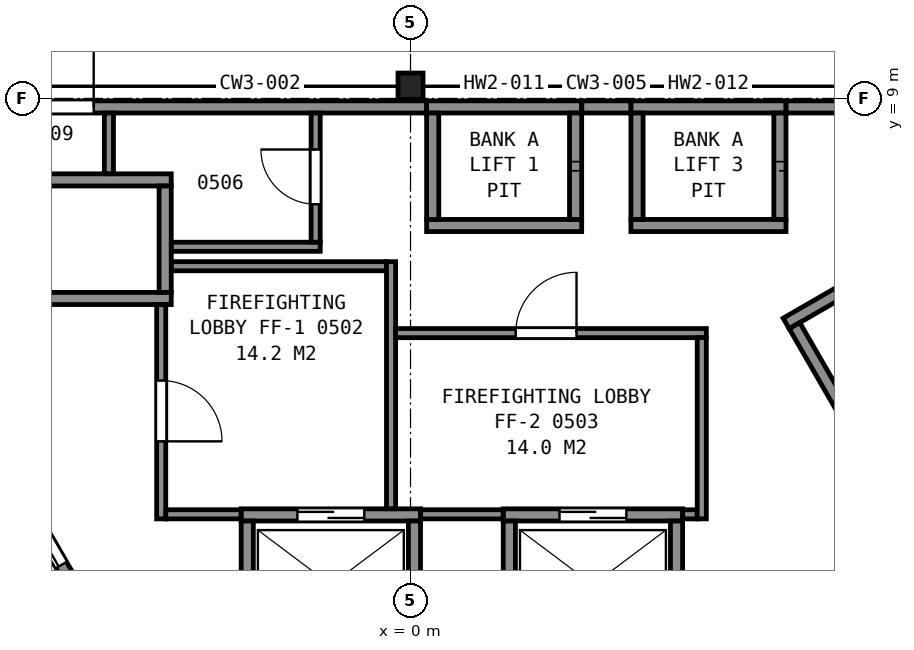
"""IFC4 building model, lengths in metres.
Left out: names, types, materials, properties, quantities, classifications, styles, units other than length and angle.
Written with IfcOpenShell. Run it as: python <this file> out.ifc"""

import sys

from ifc_helpers import new_model, si_unit, direction, frame, frame_2d, origin, origin_2d, place, context, subcontext, project, spatial, rectangle, i_section, extrude, element, fill, save


model = new_model("IFC4")
c1 = context("Model", 3, precision=1e-05, world=origin(), true_north=direction((0.0, 1.0)))
c2 = subcontext(c1, "Body", "Model", "MODEL_VIEW")
j1 = project(units=[si_unit("LENGTHUNIT", "METRE"), si_unit("PLANEANGLEUNIT", "RADIAN")], contexts=[c1])
p1 = place(None, origin())
s1 = spatial("IfcSite", under=j1, at=p1, CompositionType="ELEMENT")
p2 = place(p1, origin())
s2 = spatial("IfcBuilding", under=s1, at=p2, CompositionType="ELEMENT")
p3 = place(p2, frame((0.0, 0.0, 32.0)))
s3 = spatial("IfcBuildingStorey", under=s2, at=p3, CompositionType="ELEMENT", Elevation=32.0)
p4 = place(p3, frame((0.0, 9.2, 0.0), z_axis=(0.0, 0.0, 1.0), x_axis=(1.0, 0.0, 0.0)))
e1 = element("IfcColumn", 1, at=p4, inside=s3, PredefinedType="COLUMN", context=c2, shape_type="SweptSolid", body=[
    extrude(i_section(OverallWidth=0.411, OverallDepth=0.434, WebThickness=0.036, FlangeThickness=0.057, FilletRadius=0.015, at=origin_2d()), origin(), (0.0, 0.0, 1.0), 4.8),
])
p5 = place(p3, frame((6.178, 5.299, 0.0), z_axis=(0.0, 0.0, 1.0), x_axis=(0.866026010844, 0.49999894854, 0.0)))
e2 = element("IfcWall", 2, at=p5, inside=s3, PredefinedType="PARTITIONING", context=c2, shape_type="SweptSolid", body=[
    extrude(rectangle(XDim=12.0, YDim=0.2, at=frame_2d((6.0, 0.0))), origin(), (0.0, 0.0, 1.0), 4.55),
])
p6 = place(p3, frame((7.715, 2.838, 0.0), z_axis=(0.0, 0.0, 1.0), x_axis=(-0.500049511043, 0.865996816683, 0.0)))
e3 = element("IfcWall", 3, at=p6, inside=s3, PredefinedType="PARTITIONING", context=c2, shape_type="SweptSolid", body=[
    extrude(rectangle(XDim=2.8, YDim=0.2, at=frame_2d((1.4, 0.0))), origin(), (0.0, 0.0, 1.0), 4.55),
])
p7 = place(p3, frame((-2.785, 2.15, 0.0), z_axis=(0.0, 0.0, 1.0), x_axis=(1.0, 0.0, 0.0)))
e4 = element("IfcWall", 4, at=p7, inside=s3, PredefinedType="PARTITIONING", context=c2, shape_type="SweptSolid", body=[
    extrude(rectangle(XDim=2.95, YDim=0.2, at=frame_2d((1.475, 0.0))), origin(), (0.0, 0.0, 1.0), 4.8),
])
p8 = place(p7, frame((0.925, 0.0, 0.0)))
e5 = element("IfcOpeningElement", 5, at=p8, cuts=e4, PredefinedType="OPENING", context=c2, shape_type="SweptSolid", body=[
    extrude(rectangle(XDim=1.1, YDim=2.1, at=frame_2d((0.55, 1.05))), frame((0.0, 0.11, 0.0), z_axis=(0.0, -1.0, 0.0), x_axis=(1.0, 0.0, 0.0)), (0.0, 0.0, 1.0), 0.22),
])
p9 = place(p3, frame((1.525, 2.15, 0.0), z_axis=(0.0, 0.0, 1.0), x_axis=(1.0, 0.0, 0.0)))
e6 = element("IfcWall", 6, at=p9, inside=s3, PredefinedType="PARTITIONING", context=c2, shape_type="SweptSolid", body=[
    extrude(rectangle(XDim=2.95, YDim=0.2, at=frame_2d((1.475, 0.0))), origin(), (0.0, 0.0, 1.0), 4.8),
])
p10 = place(p9, frame((0.925, 0.0, 0.0)))
e7 = element("IfcOpeningElement", 7, at=p10, cuts=e6, PredefinedType="OPENING", context=c2, shape_type="SweptSolid", body=[
    extrude(rectangle(XDim=1.1, YDim=2.1, at=frame_2d((0.55, 1.05))), frame((0.0, 0.11, 0.0), z_axis=(0.0, -1.0, 0.0), x_axis=(1.0, 0.0, 0.0)), (0.0, 0.0, 1.0), 0.22),
])
p11 = place(p3, frame((-6.285, 5.71, 0.0), z_axis=(0.0, 0.0, 1.0), x_axis=(1.0, 0.0, 0.0)))
e8 = element("IfcWall", 8, at=p11, inside=s3, PredefinedType="PARTITIONING", context=c2, shape_type="SweptSolid", body=[
    extrude(rectangle(XDim=2.35, YDim=0.2, at=frame_2d((1.175, 0.0))), origin(), (0.0, 0.0, 1.0), 4.8),
])
for number, where, z_axis, x_axis in (
    (9, (0.265, 6.91, 0.0), (0.0, 0.0, 1.0), (1.0, 0.0, 0.0)),
    (10, (3.625, 6.91, 0.0), (0.0, 0.0, 1.0), (1.0, 0.0, 0.0)),
):
    element("IfcWall", number, at=place(p3, frame(where, z_axis=z_axis, x_axis=x_axis)), inside=s3, PredefinedType="PARTITIONING", context=c2, shape_type="SweptSolid", body=[
        extrude(rectangle(XDim=2.55, YDim=0.2, at=frame_2d((1.275, 0.0))), origin(), (0.0, 0.0, 1.0), 4.8),
    ])
p12 = place(p3, frame((-6.285, 7.66, 0.0), z_axis=(0.0, 0.0, 1.0), x_axis=(1.0, 0.0, 0.0)))
e11 = element("IfcWall", 11, at=p12, inside=s3, PredefinedType="PARTITIONING", context=c2, shape_type="SweptSolid", body=[
    extrude(rectangle(XDim=2.35, YDim=0.2, at=frame_2d((1.175, 0.0))), origin(), (0.0, 0.0, 1.0), 4.8),
])
for number, where, z_axis, x_axis in (
    (12, (0.265, 8.86, 0.0), (0.0, 0.0, 1.0), (1.0, 0.0, 0.0)),
    (13, (3.625, 8.86, 0.0), (0.0, 0.0, 1.0), (1.0, 0.0, 0.0)),
):
    element("IfcWall", number, at=place(p3, frame(where, z_axis=z_axis, x_axis=x_axis)), inside=s3, PredefinedType="PARTITIONING", context=c2, shape_type="SweptSolid", body=[
        extrude(rectangle(XDim=2.55, YDim=0.2, at=frame_2d((1.275, 0.0))), origin(), (0.0, 0.0, 1.0), 4.8),
    ])
p13 = place(p3, frame((5.663, -1.612, 0.0), z_axis=(0.0, 0.0, 1.0), x_axis=(0.49998122708, 0.866036242063, 0.0)))
e14 = element("IfcWall", 14, at=p13, inside=s3, PredefinedType="PARTITIONING", context=c2, shape_type="SweptSolid", body=[
    extrude(rectangle(XDim=4.9, YDim=0.2, at=frame_2d((2.45, 0.0))), origin(), (0.0, 0.0, 1.0), 4.8),
])
p14 = place(p3, frame((6.075, 7.01, 0.0), z_axis=(0.0, 0.0, 1.0), x_axis=(0.0, 1.0, 0.0)))
e15 = element("IfcWall", 15, at=p14, inside=s3, PredefinedType="PARTITIONING", context=c2, shape_type="SweptSolid", body=[
    extrude(rectangle(XDim=1.75, YDim=0.2, at=frame_2d((0.875, 0.0))), origin(), (0.0, 0.0, 1.0), 4.8),
])
p15 = place(p3, frame((4.375, 0.1, 0.0), z_axis=(0.0, 0.0, 1.0), x_axis=(0.0, 1.0, 0.0)))
e16 = element("IfcWall", 16, at=p15, inside=s3, PredefinedType="PARTITIONING", context=c2, shape_type="SweptSolid", body=[
    extrude(rectangle(XDim=1.95, YDim=0.2, at=frame_2d((0.975, 0.0))), origin(), (0.0, 0.0, 1.0), 4.8),
])
for number, where, z_axis, x_axis in (
    (17, (3.725, 7.01, 0.0), (0.0, 0.0, 1.0), (0.0, 1.0, 0.0)),
    (18, (2.715, 7.01, 0.0), (0.0, 0.0, 1.0), (0.0, 1.0, 0.0)),
):
    element("IfcWall", number, at=place(p3, frame(where, z_axis=z_axis, x_axis=x_axis)), inside=s3, PredefinedType="PARTITIONING", context=c2, shape_type="SweptSolid", body=[
        extrude(rectangle(XDim=1.75, YDim=0.2, at=frame_2d((0.875, 0.0))), origin(), (0.0, 0.0, 1.0), 4.8),
    ])
p16 = place(p3, frame((1.625, 0.1, 0.0), z_axis=(0.0, 0.0, 1.0), x_axis=(0.0, 1.0, 0.0)))
e19 = element("IfcWall", 19, at=p16, inside=s3, PredefinedType="PARTITIONING", context=c2, shape_type="SweptSolid", body=[
    extrude(rectangle(XDim=1.95, YDim=0.2, at=frame_2d((0.975, 0.0))), origin(), (0.0, 0.0, 1.0), 4.8),
])
p17 = place(p3, frame((0.365, 7.01, 0.0), z_axis=(0.0, 0.0, 1.0), x_axis=(0.0, 1.0, 0.0)))
e20 = element("IfcWall", 20, at=p17, inside=s3, PredefinedType="PARTITIONING", context=c2, shape_type="SweptSolid", body=[
    extrude(rectangle(XDim=1.75, YDim=0.2, at=frame_2d((0.875, 0.0))), origin(), (0.0, 0.0, 1.0), 4.8),
])
for number, where, z_axis, x_axis in (
    (21, (0.065, 0.1, 0.0), (0.0, 0.0, 1.0), (0.0, 1.0, 0.0)),
    (22, (-2.685, 0.1, 0.0), (0.0, 0.0, 1.0), (0.0, 1.0, 0.0)),
):
    element("IfcWall", number, at=place(p3, frame(where, z_axis=z_axis, x_axis=x_axis)), inside=s3, PredefinedType="PARTITIONING", context=c2, shape_type="SweptSolid", body=[
        extrude(rectangle(XDim=1.95, YDim=0.2, at=frame_2d((0.975, 0.0))), origin(), (0.0, 0.0, 1.0), 4.8),
    ])
p18 = place(p3, frame((-4.035, 5.81, 0.0), z_axis=(0.0, 0.0, 1.0), x_axis=(0.0, 1.0, 0.0)))
e23 = element("IfcWall", 23, at=p18, inside=s3, PredefinedType="PARTITIONING", context=c2, shape_type="SweptSolid", body=[
    extrude(rectangle(XDim=1.75, YDim=0.2, at=frame_2d((0.875, 0.0))), origin(), (0.0, 0.0, 1.0), 4.8),
])
p19 = place(p3, frame((-5.28, 0.525, 0.0), z_axis=(0.0, 0.0, 1.0), x_axis=(-0.500037662692, 0.866003658127, 0.0)))
e24 = element("IfcWall", 24, at=p19, inside=s3, PredefinedType="PARTITIONING", context=c2, shape_type="SweptSolid", body=[
    extrude(rectangle(XDim=2.95, YDim=0.2, at=frame_2d((1.475, 0.0))), origin(), (0.0, 0.0, 1.0), 4.8),
])
p20 = place(p19, frame((0.925, 0.0, 0.0)))
e25 = element("IfcOpeningElement", 25, at=p20, cuts=e24, PredefinedType="OPENING", context=c2, shape_type="SweptSolid", body=[
    extrude(rectangle(XDim=1.1, YDim=2.1, at=frame_2d((0.55, 1.05))), frame((0.0, 0.11, 0.0), z_axis=(0.0, -1.0, 0.0), x_axis=(1.0, 0.0, 0.0)), (0.0, 0.0, 1.0), 0.22),
])
p21 = place(p3, frame((0.263, 8.86, 0.0), z_axis=(0.0, 0.0, 1.0), x_axis=(-1.0, 0.0, 0.0)))
e26 = element("IfcWall", 26, at=p21, inside=s3, PredefinedType="PARTITIONING", context=c2, shape_type="SweptSolid", body=[
    extrude(rectangle(XDim=12.254, YDim=0.2, at=frame_2d((6.127, 0.0))), origin(), (0.0, 0.0, 1.0), 4.55),
])
p22 = place(p21, frame((5.473, 0.0, 0.0)))
e27 = element("IfcOpeningElement", 27, at=p22, cuts=e26, PredefinedType="OPENING", context=c2, shape_type="SweptSolid", body=[
    extrude(rectangle(XDim=1.8, YDim=2.1, at=frame_2d((0.9, 1.05))), frame((0.0, 0.11, 0.0), z_axis=(0.0, -1.0, 0.0), x_axis=(1.0, 0.0, 0.0)), (0.0, 0.0, 1.0), 0.22),
])
p23 = place(p3, frame((-4.96, 7.762, 0.0), z_axis=(0.0, 0.0, 1.0), x_axis=(0.0, 1.0, 0.0)))
e28 = element("IfcWall", 28, at=p23, inside=s3, PredefinedType="PARTITIONING", context=c2, shape_type="SweptSolid", body=[
    extrude(rectangle(XDim=0.998, YDim=0.15, at=frame_2d((0.499, 0.0))), origin(), (0.0, 0.0, 1.0), 4.55),
])
p24 = place(p3, frame((-4.1, 2.085, 0.0), z_axis=(0.0, 0.0, 1.0), x_axis=(0.0, 1.0, 0.0)))
e29 = element("IfcWall", 29, at=p24, inside=s3, PredefinedType="PARTITIONING", context=c2, shape_type="SweptSolid", body=[
    extrude(rectangle(XDim=3.523, YDim=0.15, at=frame_2d((1.761, 0.0))), origin(), (0.0, 0.0, 1.0), 4.55),
])
p25 = place(p24, frame((1.275, 0.0, 0.0)))
e30 = element("IfcOpeningElement", 30, at=p25, cuts=e29, PredefinedType="OPENING", context=c2, shape_type="SweptSolid", body=[
    extrude(rectangle(XDim=1.0, YDim=2.1, at=frame_2d((0.5, 1.05))), frame((0.0, 0.085, 0.0), z_axis=(0.0, -1.0, 0.0), x_axis=(1.0, 0.0, 0.0)), (0.0, 0.0, 1.0), 0.17),
])
p26 = place(p3, frame((-4.025, 2.16, 0.0), z_axis=(0.0, 0.0, 1.0), x_axis=(1.0, 0.0, 0.0)))
e31 = element("IfcWall", 31, at=p26, inside=s3, PredefinedType="PARTITIONING", context=c2, shape_type="SweptSolid", body=[
    extrude(rectangle(XDim=1.238, YDim=0.15, at=frame_2d((0.619, 0.0))), origin(), (0.0, 0.0, 1.0), 4.55),
])
p27 = place(p3, frame((-3.933, 6.24, 0.0), z_axis=(0.0, 0.0, 1.0), x_axis=(1.0, 0.0, 0.0)))
e32 = element("IfcWall", 32, at=p27, inside=s3, PredefinedType="PARTITIONING", context=c2, shape_type="SweptSolid", body=[
    extrude(rectangle(XDim=3.538, YDim=0.15, at=frame_2d((1.769, 0.0))), origin(), (0.0, 0.0, 1.0), 4.55),
])
p28 = place(p3, frame((-3.933, 6.56, 0.0), z_axis=(0.0, 0.0, 1.0), x_axis=(1.0, 0.0, 0.0)))
e33 = element("IfcWall", 33, at=p28, inside=s3, PredefinedType="PARTITIONING", context=c2, shape_type="SweptSolid", body=[
    extrude(rectangle(XDim=2.448, YDim=0.15, at=frame_2d((1.224, 0.0))), origin(), (0.0, 0.0, 1.0), 4.55),
])
p29 = place(p3, frame((-1.56, 6.635, 0.0), z_axis=(0.0, 0.0, 1.0), x_axis=(0.0, 1.0, 0.0)))
e34 = element("IfcWall", 34, at=p29, inside=s3, PredefinedType="PARTITIONING", context=c2, shape_type="SweptSolid", body=[
    extrude(rectangle(XDim=2.125, YDim=0.15, at=frame_2d((1.062, 0.0))), origin(), (0.0, 0.0, 1.0), 4.55),
])
p30 = place(p29, frame((0.625, 0.0, 0.0)))
e35 = element("IfcOpeningElement", 35, at=p30, cuts=e34, PredefinedType="OPENING", context=c2, shape_type="SweptSolid", body=[
    extrude(rectangle(XDim=0.9, YDim=2.1, at=frame_2d((0.45, 1.05))), frame((0.0, 0.085, 0.0), z_axis=(0.0, -1.0, 0.0), x_axis=(1.0, 0.0, 0.0)), (0.0, 0.0, 1.0), 0.17),
])
p31 = place(p3, frame((-0.32, 2.252, 0.0), z_axis=(0.0, 0.0, 1.0), x_axis=(0.0, 1.0, 0.0)))
e36 = element("IfcWall", 36, at=p31, inside=s3, PredefinedType="PARTITIONING", context=c2, shape_type="SweptSolid", body=[
    extrude(rectangle(XDim=4.063, YDim=0.15, at=frame_2d((2.031, 0.0))), origin(), (0.0, 0.0, 1.0), 4.55),
])
p32 = place(p3, frame((-0.245, 5.14, 0.0), z_axis=(0.0, 0.0, 1.0), x_axis=(1.0, 0.0, 0.0)))
e37 = element("IfcWall", 37, at=p32, inside=s3, PredefinedType="PARTITIONING", context=c2, shape_type="SweptSolid", body=[
    extrude(rectangle(XDim=5.11, YDim=0.15, at=frame_2d((2.555, 0.0))), origin(), (0.0, 0.0, 1.0), 4.55),
])
p33 = place(p32, frame((1.975, 0.0, 0.0)))
e38 = element("IfcOpeningElement", 38, at=p33, cuts=e37, PredefinedType="OPENING", context=c2, shape_type="SweptSolid", body=[
    extrude(rectangle(XDim=1.0, YDim=2.1, at=frame_2d((0.5, 1.05))), frame((0.0, 0.085, 0.0), z_axis=(0.0, -1.0, 0.0), x_axis=(1.0, 0.0, 0.0)), (0.0, 0.0, 1.0), 0.17),
])
p34 = place(p3, frame((0.167, 2.16, 0.0), z_axis=(0.0, 0.0, 1.0), x_axis=(1.0, 0.0, 0.0)))
e39 = element("IfcWall", 39, at=p34, inside=s3, PredefinedType="PARTITIONING", context=c2, shape_type="SweptSolid", body=[
    extrude(rectangle(XDim=1.356, YDim=0.15, at=frame_2d((0.678, 0.0))), origin(), (0.0, 0.0, 1.0), 4.55),
])
p35 = place(p3, frame((2.817, 8.86, 0.0), z_axis=(0.0, 0.0, 1.0), x_axis=(1.0, 0.0, 0.0)))
e40 = element("IfcWall", 40, at=p35, inside=s3, PredefinedType="PARTITIONING", context=c2, shape_type="SweptSolid", body=[
    extrude(rectangle(XDim=0.806, YDim=0.2, at=frame_2d((0.403, 0.0))), origin(), (0.0, 0.0, 1.0), 4.55),
])
p36 = place(p3, frame((4.477, 2.16, 0.0), z_axis=(0.0, 0.0, 1.0), x_axis=(1.0, 0.0, 0.0)))
e41 = element("IfcWall", 41, at=p36, inside=s3, PredefinedType="PARTITIONING", context=c2, shape_type="SweptSolid", body=[
    extrude(rectangle(XDim=0.238, YDim=0.15, at=frame_2d((0.119, 0.0))), origin(), (0.0, 0.0, 1.0), 4.55),
])
p37 = place(p3, frame((4.79, 2.085, 0.0), z_axis=(0.0, 0.0, 1.0), x_axis=(0.0, 1.0, 0.0)))
e42 = element("IfcWall", 42, at=p37, inside=s3, PredefinedType="PARTITIONING", context=c2, shape_type="SweptSolid", body=[
    extrude(rectangle(XDim=2.98, YDim=0.15, at=frame_2d((1.49, 0.0))), origin(), (0.0, 0.0, 1.0), 4.55),
])
p38 = place(p3, frame((6.177, 8.86, 0.0), z_axis=(0.0, 0.0, 1.0), x_axis=(1.0, 0.0, 0.0)))
e43 = element("IfcWall", 43, at=p38, inside=s3, PredefinedType="PARTITIONING", context=c2, shape_type="SweptSolid", body=[
    extrude(rectangle(XDim=5.814, YDim=0.2, at=frame_2d((2.907, 0.0))), origin(), (0.0, 0.0, 1.0), 4.55),
])
p39 = place(p3, frame((-4.438, -20.054, 0.0), z_axis=(0.0, 0.0, 1.0), x_axis=(-0.499994028088, 0.866028851642, 0.0)))
e44 = element("IfcWall", 44, at=p39, inside=s3, PredefinedType="PARTITIONING", context=c2, shape_type="SweptSolid", body=[
    extrude(rectangle(XDim=30.297, YDim=0.125, at=frame_2d((15.148, 0.0))), origin(), (0.0, 0.0, 1.0), 3.793),
])
p40 = place(p39, frame((26.385, 0.0, 0.0)))
e45 = element("IfcOpeningElement", 45, at=p40, cuts=e44, PredefinedType="OPENING", context=c2, shape_type="SweptSolid", body=[
    extrude(rectangle(XDim=1.0, YDim=2.1, at=frame_2d((0.5, 1.05))), frame((0.0, 0.073, 0.0), z_axis=(0.0, -1.0, 0.0), x_axis=(1.0, 0.0, 0.0)), (0.0, 0.0, 1.0), 0.145),
])
p41 = place(p39, frame((18.831, 0.0, 0.0)))
e46 = element("IfcOpeningElement", 46, at=p41, cuts=e44, PredefinedType="OPENING", context=c2, shape_type="SweptSolid", body=[
    extrude(rectangle(XDim=1.0, YDim=2.1, at=frame_2d((0.5, 1.05))), frame((0.0, 0.073, 0.0), z_axis=(0.0, -1.0, 0.0), x_axis=(1.0, 0.0, 0.0)), (0.0, 0.0, 1.0), 0.145),
])
p42 = place(p39, frame((10.449, 0.0, 0.0)))
e47 = element("IfcOpeningElement", 47, at=p42, cuts=e44, PredefinedType="OPENING", context=c2, shape_type="SweptSolid", body=[
    extrude(rectangle(XDim=1.0, YDim=2.1, at=frame_2d((0.5, 1.05))), frame((0.0, 0.073, 0.0), z_axis=(0.0, -1.0, 0.0), x_axis=(1.0, 0.0, 0.0)), (0.0, 0.0, 1.0), 0.145),
])
p43 = place(p39, frame((2.916, 0.0, 0.0)))
e48 = element("IfcOpeningElement", 48, at=p43, cuts=e44, PredefinedType="OPENING", context=c2, shape_type="SweptSolid", body=[
    extrude(rectangle(XDim=1.0, YDim=2.1, at=frame_2d((0.5, 1.05))), frame((0.0, 0.073, 0.0), z_axis=(0.0, -1.0, 0.0), x_axis=(1.0, 0.0, 0.0)), (0.0, 0.0, 1.0), 0.145),
])
p44 = place(p3, frame((19.586, 6.184, 0.0), z_axis=(0.0, 0.0, 1.0), x_axis=(-0.499994028088, -0.866028851642, 0.0)))
e49 = element("IfcWall", 49, at=p44, inside=s3, PredefinedType="PARTITIONING", context=c2, shape_type="SweptSolid", body=[
    extrude(rectangle(XDim=30.297, YDim=0.125, at=frame_2d((15.148, 0.0))), origin(), (0.0, 0.0, 1.0), 3.793),
])
p45 = place(p44, frame((26.385, 0.0, 0.0)))
e50 = element("IfcOpeningElement", 50, at=p45, cuts=e49, PredefinedType="OPENING", context=c2, shape_type="SweptSolid", body=[
    extrude(rectangle(XDim=1.0, YDim=2.1, at=frame_2d((0.5, 1.05))), frame((0.0, 0.073, 0.0), z_axis=(0.0, -1.0, 0.0), x_axis=(1.0, 0.0, 0.0)), (0.0, 0.0, 1.0), 0.145),
])
p46 = place(p44, frame((20.932, 0.0, 0.0)))
e51 = element("IfcOpeningElement", 51, at=p46, cuts=e49, PredefinedType="OPENING", context=c2, shape_type="SweptSolid", body=[
    extrude(rectangle(XDim=1.0, YDim=2.1, at=frame_2d((0.5, 1.05))), frame((0.0, 0.073, 0.0), z_axis=(0.0, -1.0, 0.0), x_axis=(1.0, 0.0, 0.0)), (0.0, 0.0, 1.0), 0.145),
])
p47 = place(p44, frame((16.741, 0.0, 0.0)))
e52 = element("IfcOpeningElement", 52, at=p47, cuts=e49, PredefinedType="OPENING", context=c2, shape_type="SweptSolid", body=[
    extrude(rectangle(XDim=1.0, YDim=2.1, at=frame_2d((0.5, 1.05))), frame((0.0, 0.073, 0.0), z_axis=(0.0, -1.0, 0.0), x_axis=(1.0, 0.0, 0.0)), (0.0, 0.0, 1.0), 0.145),
])
p48 = place(p44, frame((10.449, 0.0, 0.0)))
e53 = element("IfcOpeningElement", 53, at=p48, cuts=e49, PredefinedType="OPENING", context=c2, shape_type="SweptSolid", body=[
    extrude(rectangle(XDim=1.0, YDim=2.1, at=frame_2d((0.5, 1.05))), frame((0.0, 0.073, 0.0), z_axis=(0.0, -1.0, 0.0), x_axis=(1.0, 0.0, 0.0)), (0.0, 0.0, 1.0), 0.145),
])
p49 = place(p44, frame((2.916, 0.0, 0.0)))
e54 = element("IfcOpeningElement", 54, at=p49, cuts=e49, PredefinedType="OPENING", context=c2, shape_type="SweptSolid", body=[
    extrude(rectangle(XDim=1.0, YDim=2.1, at=frame_2d((0.5, 1.05))), frame((0.0, 0.073, 0.0), z_axis=(0.0, -1.0, 0.0), x_axis=(1.0, 0.0, 0.0)), (0.0, 0.0, 1.0), 0.145),
])
p50 = place(p8, origin())
e55 = element("IfcDoor", 55, at=p50, inside=s3, OperationType="SLIDING_TO_LEFT", PredefinedType="DOOR", context=c2, shape_type="SweptSolid", body=[
    extrude(rectangle(XDim=1.1, YDim=2.1, at=frame_2d((0.55, 1.05))), frame((0.0, 0.025, 0.0), z_axis=(0.0, -1.0, 0.0), x_axis=(1.0, 0.0, 0.0)), (0.0, 0.0, 1.0), 0.05),
])
fill(e5, e55)
p51 = place(p10, origin())
e56 = element("IfcDoor", 56, at=p51, inside=s3, OperationType="SLIDING_TO_RIGHT", PredefinedType="DOOR", context=c2, shape_type="SweptSolid", body=[
    extrude(rectangle(XDim=1.1, YDim=2.1, at=frame_2d((0.55, 1.05))), frame((0.0, 0.025, 0.0), z_axis=(0.0, -1.0, 0.0), x_axis=(1.0, 0.0, 0.0)), (0.0, 0.0, 1.0), 0.05),
])
fill(e7, e56)
p52 = place(p20, origin())
e57 = element("IfcDoor", 57, at=p52, inside=s3, OperationType="SLIDING_TO_LEFT", PredefinedType="DOOR", context=c2, shape_type="SweptSolid", body=[
    extrude(rectangle(XDim=1.1, YDim=2.1, at=frame_2d((0.55, 1.05))), frame((0.0, 0.025, 0.0), z_axis=(0.0, -1.0, 0.0), x_axis=(1.0, 0.0, 0.0)), (0.0, 0.0, 1.0), 0.05),
])
fill(e25, e57)
p53 = place(p22, origin())
e58 = element("IfcDoor", 58, at=p53, inside=s3, OperationType="DOUBLE_DOOR_SINGLE_SWING", PredefinedType="DOOR", context=c2, shape_type="SweptSolid", body=[
    extrude(rectangle(XDim=1.8, YDim=2.1, at=frame_2d((0.9, 1.05))), frame((0.0, 0.025, 0.0), z_axis=(0.0, -1.0, 0.0), x_axis=(1.0, 0.0, 0.0)), (0.0, 0.0, 1.0), 0.05),
])
fill(e27, e58)
p54 = place(p25, origin())
e59 = element("IfcDoor", 59, at=p54, inside=s3, OperationType="SINGLE_SWING_LEFT", PredefinedType="DOOR", context=c2, shape_type="SweptSolid", body=[
    extrude(rectangle(XDim=1.0, YDim=2.1, at=frame_2d((0.5, 1.05))), frame((0.0, 0.025, 0.0), z_axis=(0.0, -1.0, 0.0), x_axis=(1.0, 0.0, 0.0)), (0.0, 0.0, 1.0), 0.05),
])
fill(e30, e59)
p55 = place(p30, origin())
e60 = element("IfcDoor", 60, at=p55, inside=s3, OperationType="SINGLE_SWING_RIGHT", PredefinedType="DOOR", context=c2, shape_type="SweptSolid", body=[
    extrude(rectangle(XDim=0.9, YDim=2.1, at=frame_2d((0.45, 1.05))), frame((0.0, 0.025, 0.0), z_axis=(0.0, -1.0, 0.0), x_axis=(1.0, 0.0, 0.0)), (0.0, 0.0, 1.0), 0.05),
])
fill(e35, e60)
p56 = place(p33, origin())
e61 = element("IfcDoor", 61, at=p56, inside=s3, OperationType="SINGLE_SWING_RIGHT", PredefinedType="DOOR", context=c2, shape_type="SweptSolid", body=[
    extrude(rectangle(XDim=1.0, YDim=2.1, at=frame_2d((0.5, 1.05))), frame((0.0, 0.025, 0.0), z_axis=(0.0, -1.0, 0.0), x_axis=(1.0, 0.0, 0.0)), (0.0, 0.0, 1.0), 0.05),
])
fill(e38, e61)
save(model, sys.argv[1])
